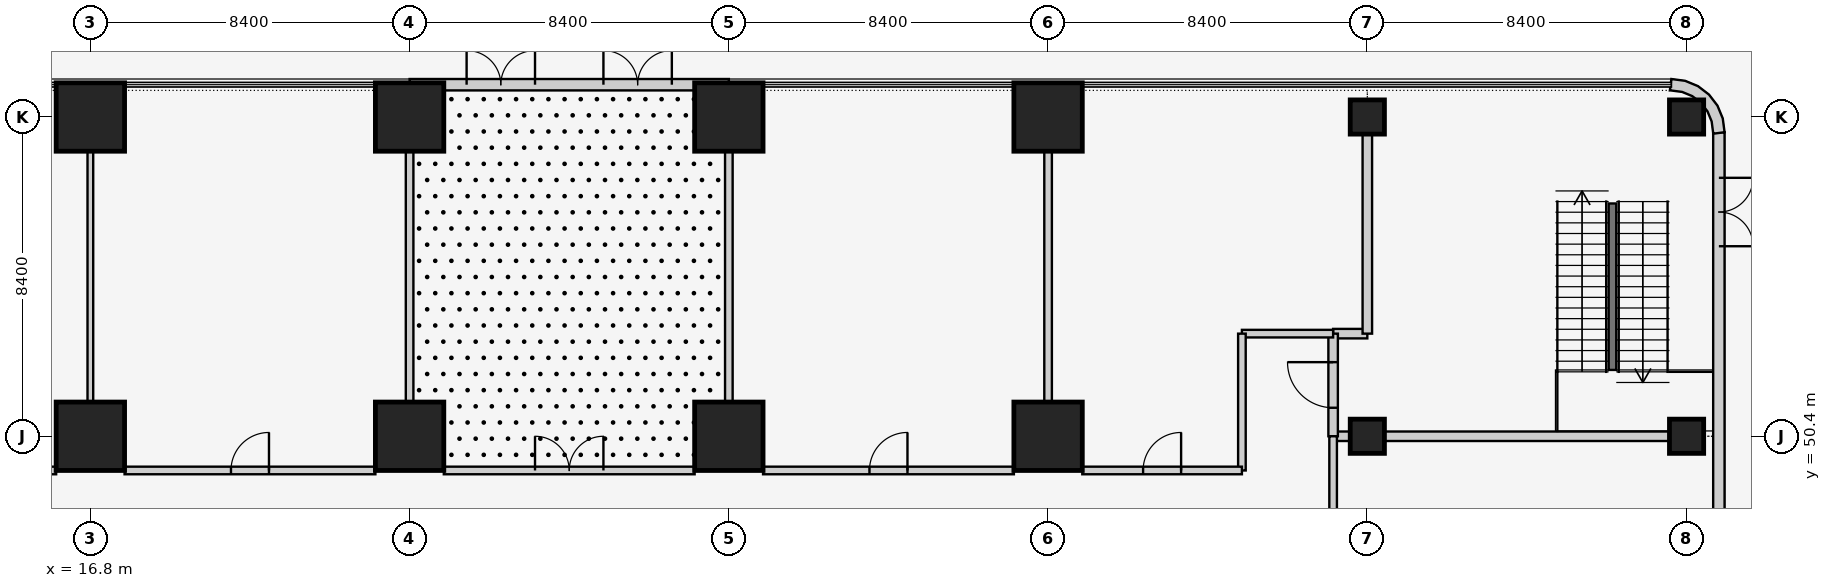
"""IFC4 building model, lengths in metres.
Left out: names, types, materials, properties, quantities, classifications, styles, units other than length and angle.
Written with IfcOpenShell. Run it as: python <this file> out.ifc"""

import sys

from ifc_helpers import new_model, si_unit, direction, frame, frame_2d, origin, origin_2d, place, context, subcontext, project, spatial, polyline, rectangle, outline, extrude, element, fill, save


model = new_model("IFC4")
c1 = context("Model", 3, precision=1e-05, world=origin(), true_north=direction((0.0, 1.0)))
c2 = subcontext(c1, "Body", "Model", "MODEL_VIEW")
j1 = project(units=[si_unit("LENGTHUNIT", "METRE"), si_unit("PLANEANGLEUNIT", "RADIAN")], contexts=[c1])
p1 = place(None, origin())
s1 = spatial("IfcSite", under=j1, at=p1, CompositionType="ELEMENT")
p2 = place(p1, origin())
s2 = spatial("IfcBuilding", under=s1, at=p2, CompositionType="ELEMENT")
p3 = place(p2, origin())
s3 = spatial("IfcBuildingStorey", under=s2, at=p3, CompositionType="ELEMENT", Elevation=0.0)
for number, where, z_axis, x_axis in (
    (1, (16.8, 50.4, 0.0), (0.0, 0.0, 1.0), (1.0, 0.0, 0.0)),
    (2, (16.8, 58.8, 0.0), (0.0, 0.0, 1.0), (1.0, 0.0, 0.0)),
    (3, (25.2, 50.4, 0.0), (0.0, 0.0, 1.0), (1.0, 0.0, 0.0)),
    (4, (25.2, 58.8, 0.0), (0.0, 0.0, 1.0), (1.0, 0.0, 0.0)),
    (5, (33.6, 50.4, 0.0), (0.0, 0.0, 1.0), (1.0, 0.0, 0.0)),
    (6, (33.6, 58.8, 0.0), (0.0, 0.0, 1.0), (1.0, 0.0, 0.0)),
    (7, (42.0, 50.4, 0.0), (0.0, 0.0, 1.0), (1.0, 0.0, 0.0)),
    (8, (42.0, 58.8, 0.0), (0.0, 0.0, 1.0), (1.0, 0.0, 0.0)),
):
    element("IfcColumn", number, at=place(p3, frame(where, z_axis=z_axis, x_axis=x_axis)), inside=s3, PredefinedType="COLUMN", context=c2, shape_type="SweptSolid", body=[
        extrude(rectangle(XDim=1.8, YDim=1.8, at=origin_2d()), origin(), (0.0, 0.0, 1.0), 6.0),
    ])
for number, where, z_axis, x_axis in (
    (9, (50.4, 50.4, 0.0), (0.0, 0.0, 1.0), (1.0, 0.0, 0.0)),
    (10, (50.4, 58.8, 0.0), (0.0, 0.0, 1.0), (1.0, 0.0, 0.0)),
    (11, (58.8, 50.4, 0.0), (0.0, 0.0, 1.0), (1.0, 0.0, 0.0)),
    (12, (58.8, 58.8, 0.0), (0.0, 0.0, 1.0), (1.0, 0.0, 0.0)),
):
    element("IfcColumn", number, at=place(p3, frame(where, z_axis=z_axis, x_axis=x_axis)), inside=s3, PredefinedType="COLUMN", context=c2, shape_type="SweptSolid", body=[
        extrude(rectangle(XDim=0.9, YDim=0.9, at=origin_2d()), origin(), (0.0, 0.0, 1.0), 6.0),
    ])
p4 = place(p3, frame((59.65, 25.2, 0.0), z_axis=(0.0, 0.0, 1.0), x_axis=(0.0, 1.0, 0.0)))
e13 = element("IfcWall", 13, at=p4, inside=s3, PredefinedType="SOLIDWALL", context=c2, shape_type="SweptSolid", body=[
    extrude(rectangle(XDim=33.2, YDim=0.3, at=frame_2d((16.6, 0.0))), origin(), (0.0, 0.0, 1.0), 5.8),
])
p5 = place(p4, frame((3.0, 0.0, 0.0)))
e14 = element("IfcOpeningElement", 14, at=p5, cuts=e13, PredefinedType="OPENING", context=c2, shape_type="SweptSolid", body=[
    extrude(rectangle(XDim=1.2, YDim=2.4, at=frame_2d((0.6, 1.2))), frame((0.0, 0.16, 0.0), z_axis=(0.0, -1.0, 0.0), x_axis=(1.0, 0.0, 0.0)), (0.0, 0.0, 1.0), 0.32),
])
p6 = place(p4, frame((20.4, 0.0, 0.0)))
e15 = element("IfcOpeningElement", 15, at=p6, cuts=e13, PredefinedType="OPENING", context=c2, shape_type="SweptSolid", body=[
    extrude(rectangle(XDim=1.2, YDim=2.4, at=frame_2d((0.6, 1.2))), frame((0.0, 0.16, 0.0), z_axis=(0.0, -1.0, 0.0), x_axis=(1.0, 0.0, 0.0)), (0.0, 0.0, 1.0), 0.32),
])
p7 = place(p4, frame((30.2, 0.0, 0.0)))
e16 = element("IfcOpeningElement", 16, at=p7, cuts=e13, PredefinedType="OPENING", context=c2, shape_type="SweptSolid", body=[
    extrude(rectangle(XDim=1.8, YDim=2.4, at=frame_2d((0.9, 1.2))), frame((0.0, 0.16, 0.0), z_axis=(0.0, -1.0, 0.0), x_axis=(1.0, 0.0, 0.0)), (0.0, 0.0, 1.0), 0.32),
])
p8 = place(p3, frame((33.6, 59.65, 0.0), z_axis=(0.0, 0.0, 1.0), x_axis=(-1.0, 0.0, 0.0)))
e17 = element("IfcWall", 17, at=p8, inside=s3, PredefinedType="SOLIDWALL", context=c2, shape_type="SweptSolid", body=[
    extrude(rectangle(XDim=8.4, YDim=0.3, at=frame_2d((4.2, 0.0))), origin(), (0.0, 0.0, 1.0), 5.8),
])
p9 = place(p8, frame((5.1, 0.0, 0.0)))
e18 = element("IfcOpeningElement", 18, at=p9, cuts=e17, PredefinedType="OPENING", context=c2, shape_type="SweptSolid", body=[
    extrude(rectangle(XDim=1.8, YDim=2.4, at=frame_2d((0.9, 1.2))), frame((0.0, 0.16, 0.0), z_axis=(0.0, -1.0, 0.0), x_axis=(1.0, 0.0, 0.0)), (0.0, 0.0, 1.0), 0.32),
])
p10 = place(p8, frame((1.5, 0.0, 0.0)))
e19 = element("IfcOpeningElement", 19, at=p10, cuts=e17, PredefinedType="OPENING", context=c2, shape_type="SweptSolid", body=[
    extrude(rectangle(XDim=1.8, YDim=2.4, at=frame_2d((0.9, 1.2))), frame((0.0, 0.16, 0.0), z_axis=(0.0, -1.0, 0.0), x_axis=(1.0, 0.0, 0.0)), (0.0, 0.0, 1.0), 0.32),
])
p11 = place(p3, frame((59.648, 58.355, 0.0), z_axis=(0.0, 0.0, 1.0), x_axis=(0.707106781187, 0.707106781187, 0.0)))
e20 = element("IfcWall", 20, at=p11, inside=s3, PredefinedType="SOLIDWALL", context=c2, shape_type="SweptSolid", body=[
    extrude(outline(polyline([(0.139, 1.904), (-0.101, 1.72), (-0.087, 1.706), (0.1, 1.463), (0.209, 1.198), (0.246, 0.914), (0.209, 0.63), (0.1, 0.365), (-0.087, 0.122), (-0.101, 0.108), (0.139, -0.076), (0.362, 0.214), (0.502, 0.552), (0.549, 0.914), (0.502, 1.276), (0.362, 1.614), (0.139, 1.904)])), origin(), (0.0, 0.0, 1.0), 5.8),
])
p12 = place(p3, frame((49.95, 50.4, 0.0), z_axis=(0.0, 0.0, 1.0), x_axis=(-1.0, 0.0, 0.0)))
e21 = element("IfcWall", 21, at=p12, inside=s3, PredefinedType="SOLIDWALL", context=c2, shape_type="SweptSolid", body=[
    extrude(rectangle(XDim=0.45, YDim=0.25, at=frame_2d((0.225, 0.0))), origin(), (0.0, 0.0, 1.0), 5.043),
])
p13 = place(p3, frame((58.35, 50.4, 0.0), z_axis=(0.0, 0.0, 1.0), x_axis=(-1.0, 0.0, 0.0)))
e22 = element("IfcWall", 22, at=p13, inside=s3, PredefinedType="SOLIDWALL", context=c2, shape_type="SweptSolid", body=[
    extrude(rectangle(XDim=7.5, YDim=0.25, at=frame_2d((3.75, 0.0))), origin(), (0.0, 0.0, 1.0), 5.043),
])
p14 = place(p3, frame((49.5, 53.1, 0.0), z_axis=(0.0, 0.0, 1.0), x_axis=(1.0, 0.0, 0.0)))
e23 = element("IfcWall", 23, at=p14, inside=s3, PredefinedType="SOLIDWALL", context=c2, shape_type="SweptSolid", body=[
    extrude(rectangle(XDim=0.9, YDim=0.25, at=frame_2d((0.45, 0.0))), origin(), (0.0, 0.0, 1.0), 5.8),
])
p15 = place(p3, frame((50.4, 53.1, 0.0), z_axis=(0.0, 0.0, 1.0), x_axis=(0.0, 1.0, 0.0)))
e24 = element("IfcWall", 24, at=p15, inside=s3, PredefinedType="SOLIDWALL", context=c2, shape_type="SweptSolid", body=[
    extrude(rectangle(XDim=5.25, YDim=0.25, at=frame_2d((2.625, 0.0))), origin(), (0.0, 0.0, 1.0), 5.043),
])
p16 = place(p3, frame((49.5, 50.4, 0.0), z_axis=(0.0, 0.0, 1.0), x_axis=(0.0, 1.0, 0.0)))
e25 = element("IfcWall", 25, at=p16, inside=s3, PredefinedType="SOLIDWALL", context=c2, shape_type="SweptSolid", body=[
    extrude(rectangle(XDim=2.7, YDim=0.25, at=frame_2d((1.35, 0.0))), origin(), (0.0, 0.0, 1.0), 5.8),
])
p17 = place(p16, frame((0.75, 0.0, 0.0)))
e26 = element("IfcOpeningElement", 26, at=p17, cuts=e25, PredefinedType="OPENING", context=c2, shape_type="SweptSolid", body=[
    extrude(rectangle(XDim=1.2, YDim=2.1, at=frame_2d((0.6, 1.05))), frame((0.0, 0.135, 0.0), z_axis=(0.0, -1.0, 0.0), x_axis=(1.0, 0.0, 0.0)), (0.0, 0.0, 1.0), 0.27),
])
p18 = place(p3, frame((49.5, 42.9, 0.0), z_axis=(0.0, 0.0, 1.0), x_axis=(0.0, 1.0, 0.0)))
e27 = element("IfcWall", 27, at=p18, inside=s3, PredefinedType="PARTITIONING", context=c2, shape_type="SweptSolid", body=[
    extrude(rectangle(XDim=7.5, YDim=0.2, at=frame_2d((3.75, 0.0))), origin(), (0.0, 0.0, 1.0), 5.8),
])
p19 = place(p18, frame((3.25, 0.0, 0.0)))
e28 = element("IfcOpeningElement", 28, at=p19, cuts=e27, PredefinedType="OPENING", context=c2, shape_type="SweptSolid", body=[
    extrude(rectangle(XDim=1.0, YDim=2.1, at=frame_2d((0.5, 1.05))), frame((0.0, 0.11, 0.0), z_axis=(0.0, -1.0, 0.0), x_axis=(1.0, 0.0, 0.0)), (0.0, 0.0, 1.0), 0.22),
])
p20 = place(p3, frame((25.2, 57.9, 0.0), z_axis=(0.0, 0.0, 1.0), x_axis=(0.0, -1.0, 0.0)))
e29 = element("IfcWall", 29, at=p20, inside=s3, PredefinedType="SOLIDWALL", context=c2, shape_type="SweptSolid", body=[
    extrude(rectangle(XDim=6.6, YDim=0.2, at=frame_2d((3.3, 0.0))), origin(), (0.0, 0.0, 1.0), 5.043),
])
p21 = place(p3, frame((16.8, 51.3, 0.0), z_axis=(0.0, 0.0, 1.0), x_axis=(0.0, 1.0, 0.0)))
e30 = element("IfcWall", 30, at=p21, inside=s3, PredefinedType="PARTITIONING", context=c2, shape_type="SweptSolid", body=[
    extrude(rectangle(XDim=6.6, YDim=0.15, at=frame_2d((3.3, 0.0))), origin(), (0.0, 0.0, 1.0), 5.043),
])
p22 = place(p3, frame((24.3, 49.5, 0.0), z_axis=(0.0, 0.0, 1.0), x_axis=(-1.0, 0.0, 0.0)))
e31 = element("IfcWall", 31, at=p22, inside=s3, PredefinedType="PARTITIONING", context=c2, shape_type="SweptSolid", body=[
    extrude(rectangle(XDim=6.6, YDim=0.2, at=frame_2d((3.3, 0.0))), origin(), (0.0, 0.0, 1.0), 5.8),
])
p23 = place(p22, frame((2.8, 0.0, 0.0)))
e32 = element("IfcOpeningElement", 32, at=p23, cuts=e31, PredefinedType="OPENING", context=c2, shape_type="SweptSolid", body=[
    extrude(rectangle(XDim=1.0, YDim=2.1, at=frame_2d((0.5, 1.05))), frame((0.0, 0.11, 0.0), z_axis=(0.0, -1.0, 0.0), x_axis=(1.0, 0.0, 0.0)), (0.0, 0.0, 1.0), 0.22),
])
p24 = place(p3, frame((33.6, 57.9, 0.0), z_axis=(0.0, 0.0, 1.0), x_axis=(0.0, -1.0, 0.0)))
e33 = element("IfcWall", 33, at=p24, inside=s3, PredefinedType="SOLIDWALL", context=c2, shape_type="SweptSolid", body=[
    extrude(rectangle(XDim=6.6, YDim=0.2, at=frame_2d((3.3, 0.0))), origin(), (0.0, 0.0, 1.0), 5.043),
])
p25 = place(p3, frame((32.7, 49.5, 0.0), z_axis=(0.0, 0.0, 1.0), x_axis=(-1.0, 0.0, 0.0)))
e34 = element("IfcWall", 34, at=p25, inside=s3, PredefinedType="SOLIDWALL", context=c2, shape_type="SweptSolid", body=[
    extrude(rectangle(XDim=6.6, YDim=0.2, at=frame_2d((3.3, 0.0))), origin(), (0.0, 0.0, 1.0), 5.8),
])
p26 = place(p25, frame((2.4, 0.0, 0.0)))
e35 = element("IfcOpeningElement", 35, at=p26, cuts=e34, PredefinedType="OPENING", context=c2, shape_type="SweptSolid", body=[
    extrude(rectangle(XDim=1.8, YDim=2.4, at=frame_2d((0.9, 1.2))), frame((0.0, 0.11, 0.0), z_axis=(0.0, -1.0, 0.0), x_axis=(1.0, 0.0, 0.0)), (0.0, 0.0, 1.0), 0.22),
])
p27 = place(p3, frame((42.0, 57.9, 0.0), z_axis=(0.0, 0.0, 1.0), x_axis=(0.0, -1.0, 0.0)))
e36 = element("IfcWall", 36, at=p27, inside=s3, PredefinedType="SOLIDWALL", context=c2, shape_type="SweptSolid", body=[
    extrude(rectangle(XDim=6.6, YDim=0.2, at=frame_2d((3.3, 0.0))), origin(), (0.0, 0.0, 1.0), 5.043),
])
p28 = place(p3, frame((41.1, 49.5, 0.0), z_axis=(0.0, 0.0, 1.0), x_axis=(-1.0, 0.0, 0.0)))
e37 = element("IfcWall", 37, at=p28, inside=s3, PredefinedType="SOLIDWALL", context=c2, shape_type="SweptSolid", body=[
    extrude(rectangle(XDim=6.6, YDim=0.2, at=frame_2d((3.3, 0.0))), origin(), (0.0, 0.0, 1.0), 5.8),
])
p29 = place(p28, frame((2.8, 0.0, 0.0)))
e38 = element("IfcOpeningElement", 38, at=p29, cuts=e37, PredefinedType="OPENING", context=c2, shape_type="SweptSolid", body=[
    extrude(rectangle(XDim=1.0, YDim=2.1, at=frame_2d((0.5, 1.05))), frame((0.0, 0.11, 0.0), z_axis=(0.0, -1.0, 0.0), x_axis=(1.0, 0.0, 0.0)), (0.0, 0.0, 1.0), 0.22),
])
p30 = place(p3, frame((15.9, 49.5, 0.0), z_axis=(0.0, 0.0, 1.0), x_axis=(-1.0, 0.0, 0.0)))
e39 = element("IfcWall", 39, at=p30, inside=s3, PredefinedType="PARTITIONING", context=c2, shape_type="SweptSolid", body=[
    extrude(rectangle(XDim=4.2, YDim=0.2, at=frame_2d((2.1, 0.0))), origin(), (0.0, 0.0, 1.0), 5.8),
])
p31 = place(p30, frame((1.6, 0.0, 0.0)))
e40 = element("IfcOpeningElement", 40, at=p31, cuts=e39, PredefinedType="OPENING", context=c2, shape_type="SweptSolid", body=[
    extrude(rectangle(XDim=1.0, YDim=2.1, at=frame_2d((0.5, 1.05))), frame((0.0, 0.11, 0.0), z_axis=(0.0, -1.0, 0.0), x_axis=(1.0, 0.0, 0.0)), (0.0, 0.0, 1.0), 0.22),
])
p32 = place(p3, frame((49.5, 53.1, 0.0), z_axis=(0.0, 0.0, 1.0), x_axis=(-1.0, 0.0, 0.0)))
e41 = element("IfcWall", 41, at=p32, inside=s3, PredefinedType="PARTITIONING", context=c2, shape_type="SweptSolid", body=[
    extrude(rectangle(XDim=2.4, YDim=0.2, at=frame_2d((1.2, 0.0))), origin(), (0.0, 0.0, 1.0), 5.8),
])
p33 = place(p3, frame((47.1, 53.1, 0.0), z_axis=(0.0, 0.0, 1.0), x_axis=(0.0, -1.0, 0.0)))
e42 = element("IfcWall", 42, at=p33, inside=s3, PredefinedType="PARTITIONING", context=c2, shape_type="SweptSolid", body=[
    extrude(rectangle(XDim=3.6, YDim=0.2, at=frame_2d((1.8, 0.0))), origin(), (0.0, 0.0, 1.0), 5.8),
])
p34 = place(p3, frame((47.1, 49.5, 0.0), z_axis=(0.0, 0.0, 1.0), x_axis=(-1.0, 0.0, 0.0)))
e43 = element("IfcWall", 43, at=p34, inside=s3, PredefinedType="PARTITIONING", context=c2, shape_type="SweptSolid", body=[
    extrude(rectangle(XDim=4.2, YDim=0.2, at=frame_2d((2.1, 0.0))), origin(), (0.0, 0.0, 1.0), 5.8),
])
p35 = place(p34, frame((1.6, 0.0, 0.0)))
e44 = element("IfcOpeningElement", 44, at=p35, cuts=e43, PredefinedType="OPENING", context=c2, shape_type="SweptSolid", body=[
    extrude(rectangle(XDim=1.0, YDim=2.1, at=frame_2d((0.5, 1.05))), frame((0.0, 0.11, 0.0), z_axis=(0.0, -1.0, 0.0), x_axis=(1.0, 0.0, 0.0)), (0.0, 0.0, 1.0), 0.22),
])
p36 = place(p3, frame((56.85, 56.525, 0.0), z_axis=(0.0, 0.0, 1.0), x_axis=(0.0, -1.0, 0.0)))
e45 = element("IfcWall", 45, at=p36, inside=s3, PredefinedType="SOLIDWALL", context=c2, shape_type="SweptSolid", body=[
    extrude(rectangle(XDim=4.38, YDim=0.2, at=frame_2d((2.19, 0.0))), origin(), (0.0, 0.0, 1.0), 6.0),
])
p37 = place(p7, frame((1.8, 0.0, 0.0), z_axis=(0.0, 0.0, 1.0), x_axis=(-1.0, 0.0, 0.0)))
e46 = element("IfcDoor", 46, at=p37, inside=s3, OperationType="DOUBLE_DOOR_SINGLE_SWING", PredefinedType="DOOR", context=c2, shape_type="SweptSolid", body=[
    extrude(rectangle(XDim=1.8, YDim=2.4, at=frame_2d((0.9, 1.2))), frame((0.0, 0.025, 0.0), z_axis=(0.0, -1.0, 0.0), x_axis=(1.0, 0.0, 0.0)), (0.0, 0.0, 1.0), 0.05),
])
fill(e16, e46)
p38 = place(p9, frame((1.8, 0.0, 0.0), z_axis=(0.0, 0.0, 1.0), x_axis=(-1.0, 0.0, 0.0)))
e47 = element("IfcDoor", 47, at=p38, inside=s3, OperationType="DOUBLE_DOOR_SINGLE_SWING", PredefinedType="DOOR", context=c2, shape_type="SweptSolid", body=[
    extrude(rectangle(XDim=1.8, YDim=2.4, at=frame_2d((0.9, 1.2))), frame((0.0, 0.025, 0.0), z_axis=(0.0, -1.0, 0.0), x_axis=(1.0, 0.0, 0.0)), (0.0, 0.0, 1.0), 0.05),
])
fill(e18, e47)
p39 = place(p10, frame((1.8, 0.0, 0.0), z_axis=(0.0, 0.0, 1.0), x_axis=(-1.0, 0.0, 0.0)))
e48 = element("IfcDoor", 48, at=p39, inside=s3, OperationType="DOUBLE_DOOR_SINGLE_SWING", PredefinedType="DOOR", context=c2, shape_type="SweptSolid", body=[
    extrude(rectangle(XDim=1.8, YDim=2.4, at=frame_2d((0.9, 1.2))), frame((0.0, 0.025, 0.0), z_axis=(0.0, -1.0, 0.0), x_axis=(1.0, 0.0, 0.0)), (0.0, 0.0, 1.0), 0.05),
])
fill(e19, e48)
p40 = place(p17, origin())
e49 = element("IfcDoor", 49, at=p40, inside=s3, OperationType="SINGLE_SWING_RIGHT", PredefinedType="DOOR", context=c2, shape_type="SweptSolid", body=[
    extrude(rectangle(XDim=1.2, YDim=2.1, at=frame_2d((0.6, 1.05))), frame((0.0, 0.025, 0.0), z_axis=(0.0, -1.0, 0.0), x_axis=(1.0, 0.0, 0.0)), (0.0, 0.0, 1.0), 0.05),
])
fill(e26, e49)
p41 = place(p23, frame((1.0, 0.0, 0.0), z_axis=(0.0, 0.0, 1.0), x_axis=(-1.0, 0.0, 0.0)))
e50 = element("IfcDoor", 50, at=p41, inside=s3, OperationType="SINGLE_SWING_RIGHT", PredefinedType="DOOR", context=c2, shape_type="SweptSolid", body=[
    extrude(rectangle(XDim=1.0, YDim=2.1, at=frame_2d((0.5, 1.05))), frame((0.0, 0.025, 0.0), z_axis=(0.0, -1.0, 0.0), x_axis=(1.0, 0.0, 0.0)), (0.0, 0.0, 1.0), 0.05),
])
fill(e32, e50)
p42 = place(p26, frame((1.8, 0.0, 0.0), z_axis=(0.0, 0.0, 1.0), x_axis=(-1.0, 0.0, 0.0)))
e51 = element("IfcDoor", 51, at=p42, inside=s3, OperationType="DOUBLE_DOOR_SINGLE_SWING", PredefinedType="DOOR", context=c2, shape_type="SweptSolid", body=[
    extrude(rectangle(XDim=1.8, YDim=2.4, at=frame_2d((0.9, 1.2))), frame((0.0, 0.025, 0.0), z_axis=(0.0, -1.0, 0.0), x_axis=(1.0, 0.0, 0.0)), (0.0, 0.0, 1.0), 0.05),
])
fill(e35, e51)
p43 = place(p29, frame((1.0, 0.0, 0.0), z_axis=(0.0, 0.0, 1.0), x_axis=(-1.0, 0.0, 0.0)))
e52 = element("IfcDoor", 52, at=p43, inside=s3, OperationType="SINGLE_SWING_RIGHT", PredefinedType="DOOR", context=c2, shape_type="SweptSolid", body=[
    extrude(rectangle(XDim=1.0, YDim=2.1, at=frame_2d((0.5, 1.05))), frame((0.0, 0.025, 0.0), z_axis=(0.0, -1.0, 0.0), x_axis=(1.0, 0.0, 0.0)), (0.0, 0.0, 1.0), 0.05),
])
fill(e38, e52)
p44 = place(p35, frame((1.0, 0.0, 0.0), z_axis=(0.0, 0.0, 1.0), x_axis=(-1.0, 0.0, 0.0)))
e53 = element("IfcDoor", 53, at=p44, inside=s3, OperationType="SINGLE_SWING_RIGHT", PredefinedType="DOOR", context=c2, shape_type="SweptSolid", body=[
    extrude(rectangle(XDim=1.0, YDim=2.1, at=frame_2d((0.5, 1.05))), frame((0.0, 0.025, 0.0), z_axis=(0.0, -1.0, 0.0), x_axis=(1.0, 0.0, 0.0)), (0.0, 0.0, 1.0), 0.05),
])
fill(e44, e53)
save(model, sys.argv[1])
